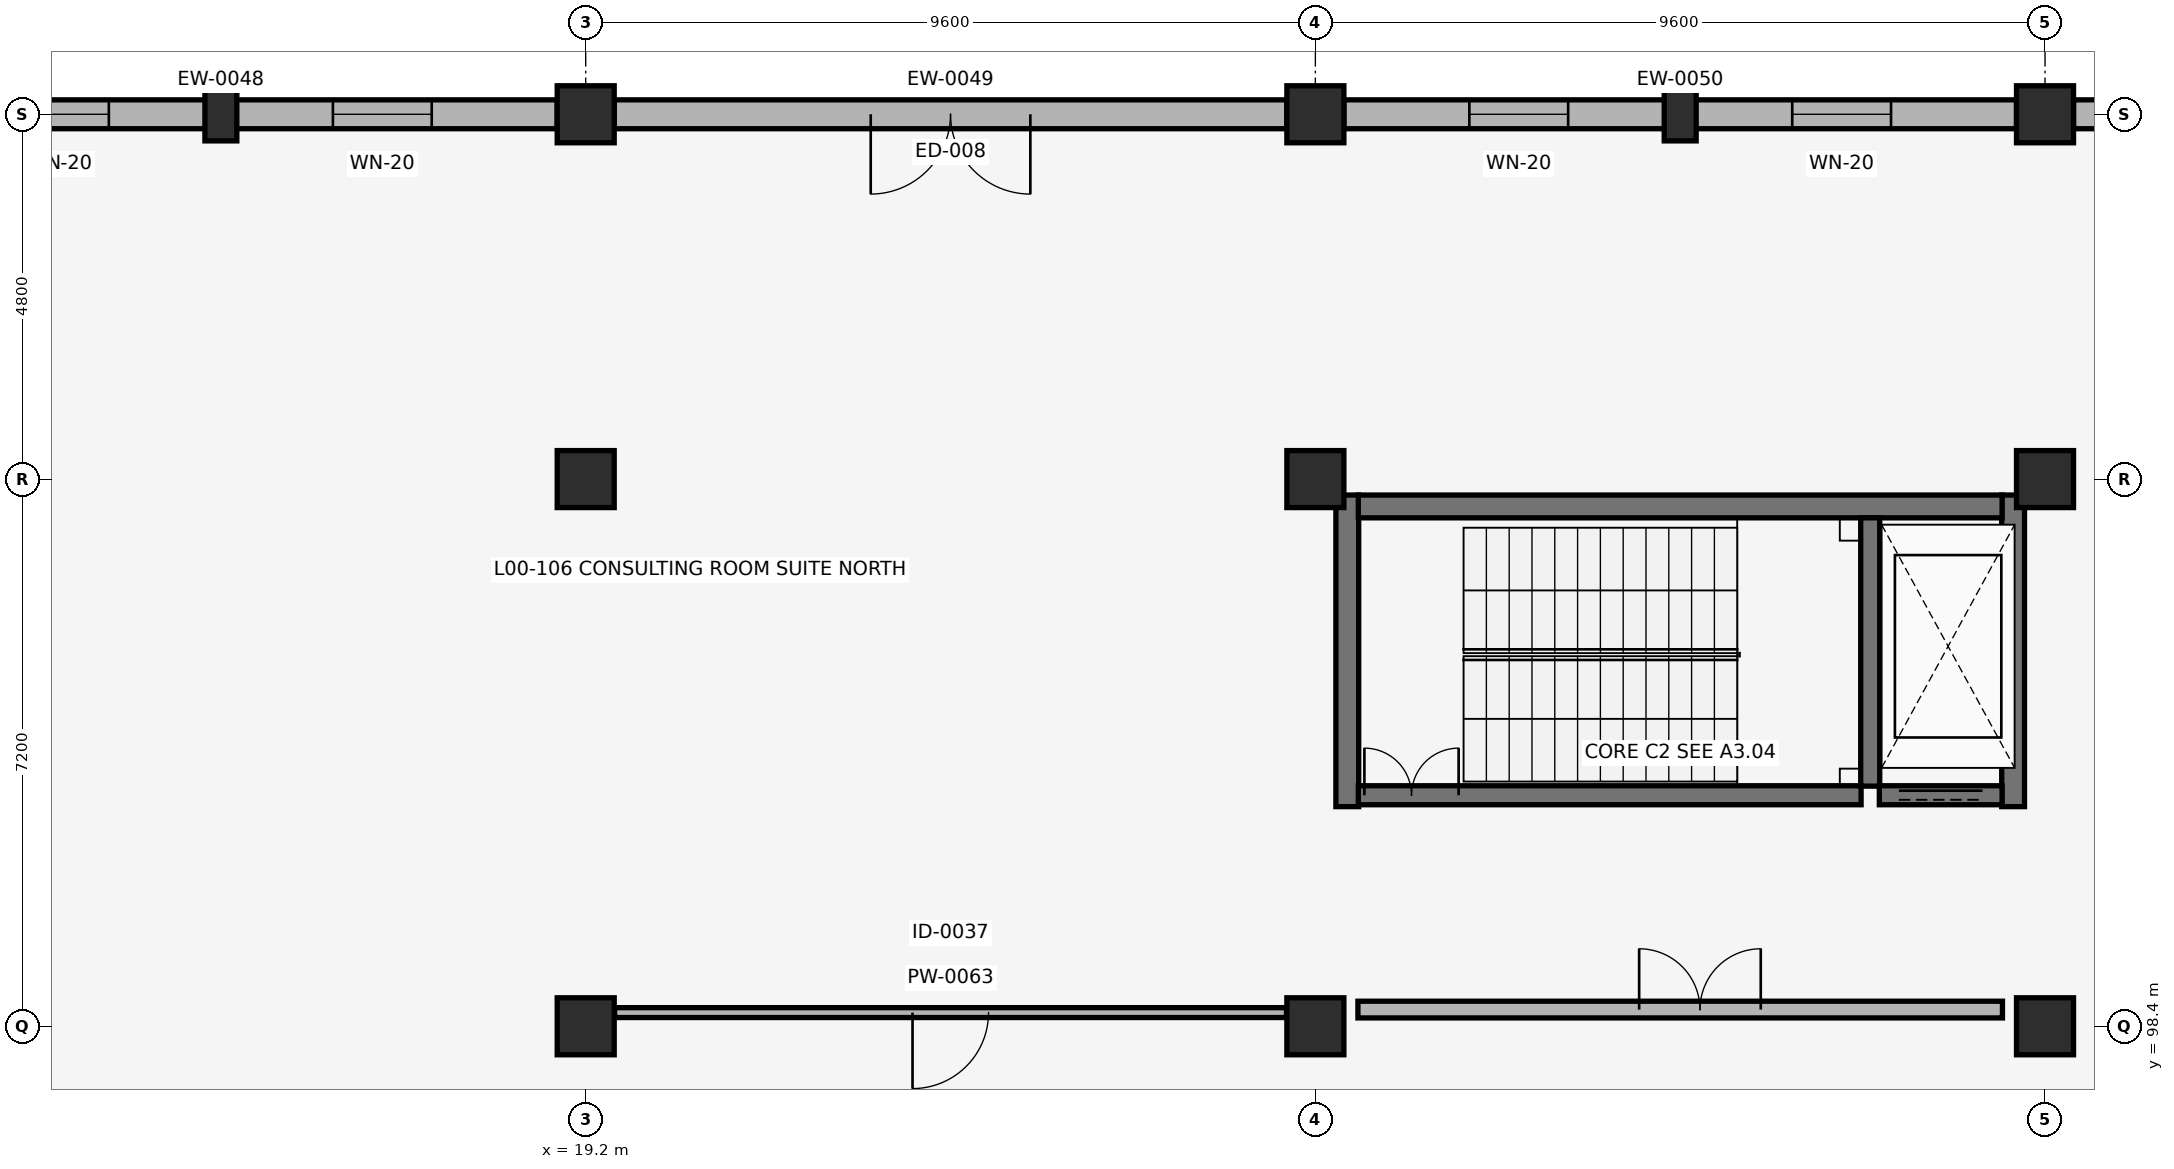
"""IFC4 building model, lengths in metres.
Left out: names, types, materials, properties, quantities, classifications, styles, units other than length and angle.
Written with IfcOpenShell. Run it as: python <this file> out.ifc"""

import sys

from ifc_helpers import new_model, si_unit, direction, frame, frame_2d, origin, origin_2d, place, context, subcontext, project, spatial, rectangle, circle, extrude, element, fill, save


model = new_model("IFC4")
c1 = context("Model", 3, precision=1e-05, world=origin(), true_north=direction((0.0, 1.0)))
c2 = subcontext(c1, "Body", "Model", "MODEL_VIEW")
j1 = project(units=[si_unit("LENGTHUNIT", "METRE"), si_unit("PLANEANGLEUNIT", "RADIAN")], contexts=[c1])
p1 = place(None, origin())
s1 = spatial("IfcSite", under=j1, at=p1, CompositionType="ELEMENT")
p2 = place(p1, origin())
s2 = spatial("IfcBuilding", under=s1, at=p2, CompositionType="ELEMENT")
p3 = place(p2, origin())
s3 = spatial("IfcBuildingStorey", under=s2, at=p3, CompositionType="ELEMENT", Elevation=0.0)
for number, where, z_axis, x_axis in (
    (1, (19.2, 98.4, -0.44), (0.0, 0.0, 1.0), (1.0, 0.0, 0.0)),
    (2, (19.2, 105.6, -0.44), (0.0, 0.0, 1.0), (1.0, 0.0, 0.0)),
    (3, (19.2, 110.4, -0.44), (0.0, 0.0, 1.0), (1.0, 0.0, 0.0)),
    (4, (28.8, 98.4, -0.44), (0.0, 0.0, 1.0), (1.0, 0.0, 0.0)),
    (5, (28.8, 105.6, -0.44), (0.0, 0.0, 1.0), (1.0, 0.0, 0.0)),
    (6, (28.8, 110.4, -0.44), (0.0, 0.0, 1.0), (1.0, 0.0, 0.0)),
    (7, (38.4, 98.4, -0.44), (0.0, 0.0, 1.0), (1.0, 0.0, 0.0)),
    (8, (38.4, 105.6, -0.44), (0.0, 0.0, 1.0), (1.0, 0.0, 0.0)),
    (9, (38.4, 110.4, -0.44), (0.0, 0.0, 1.0), (1.0, 0.0, 0.0)),
):
    element("IfcColumn", number, at=place(p3, frame(where, z_axis=z_axis, x_axis=x_axis)), inside=s3, PredefinedType="COLUMN", context=c2, shape_type="SweptSolid", body=[
        extrude(circle(Radius=0.375, at=origin_2d()), origin(), (0.0, 0.0, 1.0), 4.86),
    ])
for number, where, z_axis, x_axis in (
    (10, (14.4, 110.4, -0.44), (0.0, 0.0, 1.0), (1.0, 0.0, 0.0)),
    (11, (33.6, 110.4, -0.44), (0.0, 0.0, 1.0), (1.0, 0.0, 0.0)),
):
    element("IfcColumn", number, at=place(p3, frame(where, z_axis=z_axis, x_axis=x_axis)), inside=s3, PredefinedType="PILASTER", context=c2, shape_type="SweptSolid", body=[
        extrude(rectangle(XDim=0.42, YDim=0.7, at=origin_2d()), origin(), (0.0, 0.0, 1.0), 4.86),
    ])
p4 = place(p3, frame((18.825, 110.4, 0.0), z_axis=(0.0, 0.0, 1.0), x_axis=(-1.0, 0.0, 0.0)))
e12 = element("IfcWall", 12, at=p4, inside=s3, PredefinedType="SOLIDWALL", context=c2, shape_type="SweptSolid", body=[
    extrude(rectangle(XDim=8.85, YDim=0.38, at=frame_2d((4.425, 0.0))), origin(), (0.0, 0.0, 1.0), 3.42),
])
p5 = place(p4, frame((1.651, 0.0, 0.72)))
e13 = element("IfcOpeningElement", 13, at=p5, cuts=e12, PredefinedType="OPENING", context=c2, shape_type="SweptSolid", body=[
    extrude(rectangle(XDim=1.3, YDim=2.32, at=frame_2d((0.65, 1.16))), frame((0.0, 0.2, 0.0), z_axis=(0.0, -1.0, 0.0), x_axis=(1.0, 0.0, 0.0)), (0.0, 0.0, 1.0), 0.4),
])
p6 = place(p4, frame((5.899, 0.0, 0.72)))
e14 = element("IfcOpeningElement", 14, at=p6, cuts=e12, PredefinedType="OPENING", context=c2, shape_type="SweptSolid", body=[
    extrude(rectangle(XDim=1.3, YDim=2.32, at=frame_2d((0.65, 1.16))), frame((0.0, 0.2, 0.0), z_axis=(0.0, -1.0, 0.0), x_axis=(1.0, 0.0, 0.0)), (0.0, 0.0, 1.0), 0.4),
])
p7 = place(p3, frame((28.425, 110.4, 0.0), z_axis=(0.0, 0.0, 1.0), x_axis=(-1.0, 0.0, 0.0)))
e15 = element("IfcWall", 15, at=p7, inside=s3, PredefinedType="SOLIDWALL", context=c2, shape_type="SweptSolid", body=[
    extrude(rectangle(XDim=8.85, YDim=0.38, at=frame_2d((4.425, 0.0))), origin(), (0.0, 0.0, 1.0), 3.42),
])
p8 = place(p7, frame((3.375, 0.0, 0.0)))
e16 = element("IfcOpeningElement", 16, at=p8, cuts=e15, PredefinedType="OPENING", context=c2, shape_type="SweptSolid", body=[
    extrude(rectangle(XDim=2.1, YDim=2.3, at=frame_2d((1.05, 1.15))), frame((0.0, 0.2, 0.0), z_axis=(0.0, -1.0, 0.0), x_axis=(1.0, 0.0, 0.0)), (0.0, 0.0, 1.0), 0.4),
])
p9 = place(p3, frame((38.025, 110.4, 0.0), z_axis=(0.0, 0.0, 1.0), x_axis=(-1.0, 0.0, 0.0)))
e17 = element("IfcWall", 17, at=p9, inside=s3, PredefinedType="SOLIDWALL", context=c2, shape_type="SweptSolid", body=[
    extrude(rectangle(XDim=8.85, YDim=0.38, at=frame_2d((4.425, 0.0))), origin(), (0.0, 0.0, 1.0), 3.42),
])
p10 = place(p9, frame((1.651, 0.0, 0.72)))
e18 = element("IfcOpeningElement", 18, at=p10, cuts=e17, PredefinedType="OPENING", context=c2, shape_type="SweptSolid", body=[
    extrude(rectangle(XDim=1.3, YDim=2.32, at=frame_2d((0.65, 1.16))), frame((0.0, 0.2, 0.0), z_axis=(0.0, -1.0, 0.0), x_axis=(1.0, 0.0, 0.0)), (0.0, 0.0, 1.0), 0.4),
])
p11 = place(p9, frame((5.899, 0.0, 0.72)))
e19 = element("IfcOpeningElement", 19, at=p11, cuts=e17, PredefinedType="OPENING", context=c2, shape_type="SweptSolid", body=[
    extrude(rectangle(XDim=1.3, YDim=2.32, at=frame_2d((0.65, 1.16))), frame((0.0, 0.2, 0.0), z_axis=(0.0, -1.0, 0.0), x_axis=(1.0, 0.0, 0.0)), (0.0, 0.0, 1.0), 0.4),
])
p12 = place(p3, frame((47.625, 110.4, 0.0), z_axis=(0.0, 0.0, 1.0), x_axis=(-1.0, 0.0, 0.0)))
e20 = element("IfcWall", 20, at=p12, inside=s3, PredefinedType="SOLIDWALL", context=c2, shape_type="SweptSolid", body=[
    extrude(rectangle(XDim=8.85, YDim=0.38, at=frame_2d((4.425, 0.0))), origin(), (0.0, 0.0, 1.0), 3.42),
])
p13 = place(p12, frame((1.651, 0.0, 0.72)))
e21 = element("IfcOpeningElement", 21, at=p13, cuts=e20, PredefinedType="OPENING", context=c2, shape_type="SweptSolid", body=[
    extrude(rectangle(XDim=1.3, YDim=2.32, at=frame_2d((0.65, 1.16))), frame((0.0, 0.2, 0.0), z_axis=(0.0, -1.0, 0.0), x_axis=(1.0, 0.0, 0.0)), (0.0, 0.0, 1.0), 0.4),
])
p14 = place(p12, frame((5.899, 0.0, 0.72)))
e22 = element("IfcOpeningElement", 22, at=p14, cuts=e20, PredefinedType="OPENING", context=c2, shape_type="SweptSolid", body=[
    extrude(rectangle(XDim=1.3, YDim=2.32, at=frame_2d((0.65, 1.16))), frame((0.0, 0.2, 0.0), z_axis=(0.0, -1.0, 0.0), x_axis=(1.0, 0.0, 0.0)), (0.0, 0.0, 1.0), 0.4),
])
for number, where, z_axis, x_axis in (
    (23, (29.22, 101.29, 0.0), (0.0, 0.0, 1.0), (0.0, 1.0, 0.0)),
    (24, (37.98, 101.29, 0.0), (0.0, 0.0, 1.0), (0.0, 1.0, 0.0)),
):
    element("IfcWall", number, at=place(p3, frame(where, z_axis=z_axis, x_axis=x_axis)), inside=s3, PredefinedType="SHEAR", context=c2, shape_type="SweptSolid", body=[
        extrude(rectangle(XDim=4.1, YDim=0.3, at=frame_2d((2.05, 0.0))), origin(), (0.0, 0.0, 1.0), 4.14),
    ])
p15 = place(p3, frame((29.365, 105.24, 0.0), z_axis=(0.0, 0.0, 1.0), x_axis=(1.0, 0.0, 0.0)))
e25 = element("IfcWall", 25, at=p15, inside=s3, PredefinedType="SHEAR", context=c2, shape_type="SweptSolid", body=[
    extrude(rectangle(XDim=8.47, YDim=0.3, at=frame_2d((4.235, 0.0))), origin(), (0.0, 0.0, 1.0), 4.14),
])
p16 = place(p3, frame((36.1, 101.56, 0.0), z_axis=(0.0, 0.0, 1.0), x_axis=(0.0, 1.0, 0.0)))
e26 = element("IfcWall", 26, at=p16, inside=s3, PredefinedType="SHEAR", context=c2, shape_type="SweptSolid", body=[
    extrude(rectangle(XDim=3.53, YDim=0.25, at=frame_2d((1.765, 0.0))), origin(), (0.0, 0.0, 1.0), 4.14),
])
p17 = place(p3, frame((29.365, 101.44, 0.0), z_axis=(0.0, 0.0, 1.0), x_axis=(1.0, 0.0, 0.0)))
e27 = element("IfcWall", 27, at=p17, inside=s3, PredefinedType="SHEAR", context=c2, shape_type="SweptSolid", body=[
    extrude(rectangle(XDim=6.615, YDim=0.25, at=frame_2d((3.308, 0.0))), origin(), (0.0, 0.0, 1.0), 4.14),
])
p18 = place(p17, frame((0.08, 0.0, 0.0)))
e28 = element("IfcOpeningElement", 28, at=p18, cuts=e27, PredefinedType="OPENING", context=c2, shape_type="SweptSolid", body=[
    extrude(rectangle(XDim=1.24, YDim=2.15, at=frame_2d((0.62, 1.075))), frame((0.0, 0.135, 0.0), z_axis=(0.0, -1.0, 0.0), x_axis=(1.0, 0.0, 0.0)), (0.0, 0.0, 1.0), 0.27),
])
p19 = place(p3, frame((29.36, 98.62, 0.0), z_axis=(0.0, 0.0, 1.0), x_axis=(1.0, 0.0, 0.0)))
e29 = element("IfcWall", 29, at=p19, inside=s3, PredefinedType="PARTITIONING", context=c2, shape_type="SweptSolid", body=[
    extrude(rectangle(XDim=8.48, YDim=0.22, at=frame_2d((4.24, 0.0))), origin(), (0.0, 0.0, 1.0), 3.47),
])
p20 = place(p19, frame((3.7, 0.0, 0.0)))
e30 = element("IfcOpeningElement", 30, at=p20, cuts=e29, PredefinedType="OPENING", context=c2, shape_type="SweptSolid", body=[
    extrude(rectangle(XDim=1.6, YDim=2.2, at=frame_2d((0.8, 1.1))), frame((0.0, 0.12, 0.0), z_axis=(0.0, -1.0, 0.0), x_axis=(1.0, 0.0, 0.0)), (0.0, 0.0, 1.0), 0.24),
])
p21 = place(p3, frame((36.22, 101.44, 0.0), z_axis=(0.0, 0.0, 1.0), x_axis=(1.0, 0.0, 0.0)))
e31 = element("IfcWall", 31, at=p21, inside=s3, PredefinedType="SHEAR", context=c2, shape_type="SweptSolid", body=[
    extrude(rectangle(XDim=1.615, YDim=0.25, at=frame_2d((0.808, 0.0))), origin(), (0.0, 0.0, 1.0), 4.14),
])
p22 = place(p21, frame((0.258, 0.0, 0.0)))
e32 = element("IfcOpeningElement", 32, at=p22, cuts=e31, PredefinedType="OPENING", context=c2, shape_type="SweptSolid", body=[
    extrude(rectangle(XDim=1.1, YDim=2.15, at=frame_2d((0.55, 1.075))), frame((0.0, 0.135, 0.0), z_axis=(0.0, -1.0, 0.0), x_axis=(1.0, 0.0, 0.0)), (0.0, 0.0, 1.0), 0.27),
])
p23 = place(p3, frame((19.58, 98.58, 0.0), z_axis=(0.0, 0.0, 1.0), x_axis=(1.0, 0.0, 0.0)))
e33 = element("IfcWall", 33, at=p23, inside=s3, PredefinedType="PARTITIONING", context=c2, shape_type="SweptSolid", body=[
    extrude(rectangle(XDim=8.84, YDim=0.13, at=frame_2d((4.42, 0.0))), origin(), (0.0, 0.0, 1.0), 3.46),
])
p24 = place(p23, frame((3.92, 0.0, 0.0)))
e34 = element("IfcOpeningElement", 34, at=p24, cuts=e33, PredefinedType="OPENING", context=c2, shape_type="SweptSolid", body=[
    extrude(rectangle(XDim=1.0, YDim=2.1, at=frame_2d((0.5, 1.05))), frame((0.0, 0.075, 0.0), z_axis=(0.0, -1.0, 0.0), x_axis=(1.0, 0.0, 0.0)), (0.0, 0.0, 1.0), 0.15),
])
p25 = place(p5, origin())
e35 = element("IfcWindow", 35, at=p25, inside=s3, PartitioningType="SINGLE_PANEL", PredefinedType="WINDOW", context=c2, shape_type="SweptSolid", body=[
    extrude(rectangle(XDim=1.3, YDim=2.32, at=frame_2d((0.65, 1.16))), frame((0.0, 0.03, 0.0), z_axis=(0.0, -1.0, 0.0), x_axis=(1.0, 0.0, 0.0)), (0.0, 0.0, 1.0), 0.06),
])
fill(e13, e35)
p26 = place(p6, origin())
e36 = element("IfcWindow", 36, at=p26, inside=s3, PartitioningType="SINGLE_PANEL", PredefinedType="WINDOW", context=c2, shape_type="SweptSolid", body=[
    extrude(rectangle(XDim=1.3, YDim=2.32, at=frame_2d((0.65, 1.16))), frame((0.0, 0.03, 0.0), z_axis=(0.0, -1.0, 0.0), x_axis=(1.0, 0.0, 0.0)), (0.0, 0.0, 1.0), 0.06),
])
fill(e14, e36)
p27 = place(p8, origin())
e37 = element("IfcDoor", 37, at=p27, inside=s3, OperationType="DOUBLE_DOOR_SINGLE_SWING", PredefinedType="DOOR", context=c2, shape_type="SweptSolid", body=[
    extrude(rectangle(XDim=2.1, YDim=2.3, at=frame_2d((1.05, 1.15))), frame((0.0, 0.025, 0.0), z_axis=(0.0, -1.0, 0.0), x_axis=(1.0, 0.0, 0.0)), (0.0, 0.0, 1.0), 0.05),
])
fill(e16, e37)
p28 = place(p10, origin())
e38 = element("IfcWindow", 38, at=p28, inside=s3, PartitioningType="SINGLE_PANEL", PredefinedType="WINDOW", context=c2, shape_type="SweptSolid", body=[
    extrude(rectangle(XDim=1.3, YDim=2.32, at=frame_2d((0.65, 1.16))), frame((0.0, 0.03, 0.0), z_axis=(0.0, -1.0, 0.0), x_axis=(1.0, 0.0, 0.0)), (0.0, 0.0, 1.0), 0.06),
])
fill(e18, e38)
p29 = place(p11, origin())
e39 = element("IfcWindow", 39, at=p29, inside=s3, PartitioningType="SINGLE_PANEL", PredefinedType="WINDOW", context=c2, shape_type="SweptSolid", body=[
    extrude(rectangle(XDim=1.3, YDim=2.32, at=frame_2d((0.65, 1.16))), frame((0.0, 0.03, 0.0), z_axis=(0.0, -1.0, 0.0), x_axis=(1.0, 0.0, 0.0)), (0.0, 0.0, 1.0), 0.06),
])
fill(e19, e39)
p30 = place(p18, origin())
e40 = element("IfcDoor", 40, at=p30, inside=s3, OperationType="DOUBLE_DOOR_SINGLE_SWING", PredefinedType="DOOR", context=c2, shape_type="SweptSolid", body=[
    extrude(rectangle(XDim=1.24, YDim=2.15, at=frame_2d((0.62, 1.075))), frame((0.0, 0.025, 0.0), z_axis=(0.0, -1.0, 0.0), x_axis=(1.0, 0.0, 0.0)), (0.0, 0.0, 1.0), 0.05),
])
fill(e28, e40)
p31 = place(p20, origin())
e41 = element("IfcDoor", 41, at=p31, inside=s3, OperationType="DOUBLE_DOOR_SINGLE_SWING", PredefinedType="DOOR", context=c2, shape_type="SweptSolid", body=[
    extrude(rectangle(XDim=1.6, YDim=2.2, at=frame_2d((0.8, 1.1))), frame((0.0, 0.025, 0.0), z_axis=(0.0, -1.0, 0.0), x_axis=(1.0, 0.0, 0.0)), (0.0, 0.0, 1.0), 0.05),
])
fill(e30, e41)
p32 = place(p22, origin())
e42 = element("IfcDoor", 42, at=p32, inside=s3, OperationType="DOUBLE_DOOR_SLIDING", PredefinedType="DOOR", context=c2, shape_type="SweptSolid", body=[
    extrude(rectangle(XDim=1.1, YDim=2.15, at=frame_2d((0.55, 1.075))), frame((0.0, 0.025, 0.0), z_axis=(0.0, -1.0, 0.0), x_axis=(1.0, 0.0, 0.0)), (0.0, 0.0, 1.0), 0.05),
])
fill(e32, e42)
p33 = place(p24, origin())
e43 = element("IfcDoor", 43, at=p33, inside=s3, OperationType="SINGLE_SWING_RIGHT", PredefinedType="DOOR", context=c2, shape_type="SweptSolid", body=[
    extrude(rectangle(XDim=1.0, YDim=2.1, at=frame_2d((0.5, 1.05))), frame((0.0, 0.025, 0.0), z_axis=(0.0, -1.0, 0.0), x_axis=(1.0, 0.0, 0.0)), (0.0, 0.0, 1.0), 0.05),
])
fill(e34, e43)
save(model, sys.argv[1])
